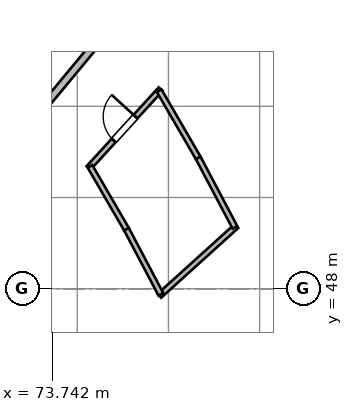
"""IFC4 building model, lengths in metres.
Left out: names, types, materials, properties, quantities, classifications, styles, units other than length and angle.
Written with IfcOpenShell. Run it as: python <this file> out.ifc"""

import sys

from ifc_helpers import new_model, si_unit, direction, frame, frame_2d, origin, place, context, subcontext, project, spatial, rectangle, extrude, source, transform, mapped, element, fill, save


model = new_model("IFC4")
c1 = context("Model", 3, precision=1e-05, world=origin(), true_north=direction((0.0, 1.0)))
c2 = subcontext(c1, "Body", "Model", "MODEL_VIEW")
j1 = project(units=[si_unit("LENGTHUNIT", "METRE"), si_unit("PLANEANGLEUNIT", "RADIAN")], contexts=[c1])
p1 = place(None, origin())
s1 = spatial("IfcSite", under=j1, at=p1, CompositionType="ELEMENT")
p2 = place(p1, origin())
s2 = spatial("IfcBuilding", under=s1, at=p2, CompositionType="ELEMENT")
p3 = place(p2, frame((0.0, 0.0, 42.6)))
s3 = spatial("IfcBuildingStorey", under=s2, at=p3, CompositionType="ELEMENT", Elevation=42.6)
m1 = source(origin(), c2, "Body", "SweptSolid", [
    extrude(rectangle(XDim=10.975, YDim=0.195, at=frame_2d((5.487, 0.0))), origin(), (0.0, 0.0, 1.0), 3.36),
])
p4 = place(p3, frame((73.46, 52.719, 0.0), z_axis=(0.0, 0.0, 1.0), x_axis=(0.638125265812, 0.769932558821, 0.0)))
e1 = element("IfcWall", 1, at=p4, inside=s3, PredefinedType="PARTITIONING", context=c2, shape_type="MappedRepresentation", body=[
    mapped(m1, transform((0.0, 0.0, 0.0), scale=1.0)),
])
m2 = source(origin(), c2, "Body", "SweptSolid", [
    extrude(rectangle(XDim=2.812, YDim=0.14, at=frame_2d((1.406, 0.0))), origin(), (0.0, 0.0, 1.0), 3.36),
])
p5 = place(p3, frame((74.697, 51.177, 0.0), z_axis=(0.0, 0.0, 1.0), x_axis=(0.675119025852, 0.737708818527, 0.0)))
e2 = element("IfcWall", 2, at=p5, inside=s3, PredefinedType="PARTITIONING", context=c2, shape_type="MappedRepresentation", body=[
    mapped(m2, transform((0.0, 0.0, 0.0), scale=1.0)),
])
p6 = place(p5, frame((0.981, 0.0, 0.0)))
e3 = element("IfcOpeningElement", 3, at=p6, cuts=e2, PredefinedType="OPENING", context=c2, shape_type="SweptSolid", body=[
    extrude(rectangle(XDim=0.85, YDim=2.05, at=frame_2d((0.425, 1.025))), frame((0.0, 0.08, 0.0), z_axis=(0.0, -1.0, 0.0), x_axis=(1.0, 0.0, 0.0)), (0.0, 0.0, 1.0), 0.16),
])
m3 = source(origin(), c2, "Body", "SweptSolid", [
    extrude(rectangle(XDim=2.738, YDim=0.14, at=frame_2d((1.369, 0.0))), origin(), (0.0, 0.0, 1.0), 3.36),
])
p7 = place(p3, frame((76.56, 47.814, 0.0), z_axis=(0.0, 0.0, 1.0), x_axis=(0.741873676582, 0.670539669218, 0.0)))
e4 = element("IfcWall", 4, at=p7, inside=s3, PredefinedType="PARTITIONING", context=c2, shape_type="MappedRepresentation", body=[
    mapped(m3, transform((0.0, 0.0, 0.0), scale=1.0)),
])
m4 = source(origin(), c2, "Body", "SweptSolid", [
    extrude(rectangle(XDim=1.914, YDim=0.14, at=frame_2d((0.957, 0.0))), origin(), (0.0, 0.0, 1.0), 3.36),
])
p8 = place(p3, frame((74.736, 51.219, 0.0), z_axis=(0.0, 0.0, 1.0), x_axis=(0.502347790612, -0.864665656347, 0.0)))
e5 = element("IfcWall", 5, at=p8, inside=s3, PredefinedType="PARTITIONING", context=c2, shape_type="MappedRepresentation", body=[
    mapped(m4, transform((0.0, 0.0, 0.0), scale=1.0)),
])
m5 = source(origin(), c2, "Body", "SweptSolid", [
    extrude(rectangle(XDim=2.045, YDim=0.14, at=frame_2d((1.022, 0.0))), origin(), (0.0, 0.0, 1.0), 3.36),
])
p9 = place(p3, frame((76.557, 53.209, 0.0), z_axis=(0.0, 0.0, 1.0), x_axis=(0.5023112139, -0.864686905411, 0.0)))
e6 = element("IfcWall", 6, at=p9, inside=s3, PredefinedType="PARTITIONING", context=c2, shape_type="MappedRepresentation", body=[
    mapped(m5, transform((0.0, 0.0, 0.0), scale=1.0)),
])
m6 = source(origin(), c2, "Body", "SweptSolid", [
    extrude(rectangle(XDim=1.936, YDim=0.14, at=frame_2d((0.968, 0.0))), origin(), (0.0, 0.0, 1.0), 3.36),
])
p10 = place(p3, frame((75.697, 49.563, 0.0), z_axis=(0.0, 0.0, 1.0), x_axis=(0.467174971862, -0.884164886017, 0.0)))
e7 = element("IfcWall", 7, at=p10, inside=s3, PredefinedType="PARTITIONING", context=c2, shape_type="MappedRepresentation", body=[
    mapped(m6, transform((0.0, 0.0, 0.0), scale=1.0)),
])
m7 = source(origin(), c2, "Body", "SweptSolid", [
    extrude(rectangle(XDim=2.068, YDim=0.14, at=frame_2d((1.034, 0.0))), origin(), (0.0, 0.0, 1.0), 3.36),
])
p11 = place(p3, frame((77.584, 51.441, 0.0), z_axis=(0.0, 0.0, 1.0), x_axis=(0.467215057643, -0.884143704333, 0.0)))
e8 = element("IfcWall", 8, at=p11, inside=s3, PredefinedType="PARTITIONING", context=c2, shape_type="MappedRepresentation", body=[
    mapped(m7, transform((0.0, 0.0, 0.0), scale=1.0)),
])
m8 = source(origin(), c2, "Body", "SweptSolid", [
    extrude(rectangle(XDim=0.85, YDim=2.05, at=frame_2d((0.425, 1.025))), frame((0.0, 0.025, 0.0), z_axis=(0.0, -1.0, 0.0), x_axis=(1.0, 0.0, 0.0)), (0.0, 0.0, 1.0), 0.05),
])
p12 = place(p6, origin())
e9 = element("IfcDoor", 9, at=p12, inside=s3, OperationType="SINGLE_SWING_RIGHT", PredefinedType="DOOR", context=c2, shape_type="MappedRepresentation", body=[
    mapped(m8, transform((0.0, 0.0, 0.0), scale=1.0)),
])
fill(e3, e9)
save(model, sys.argv[1])
